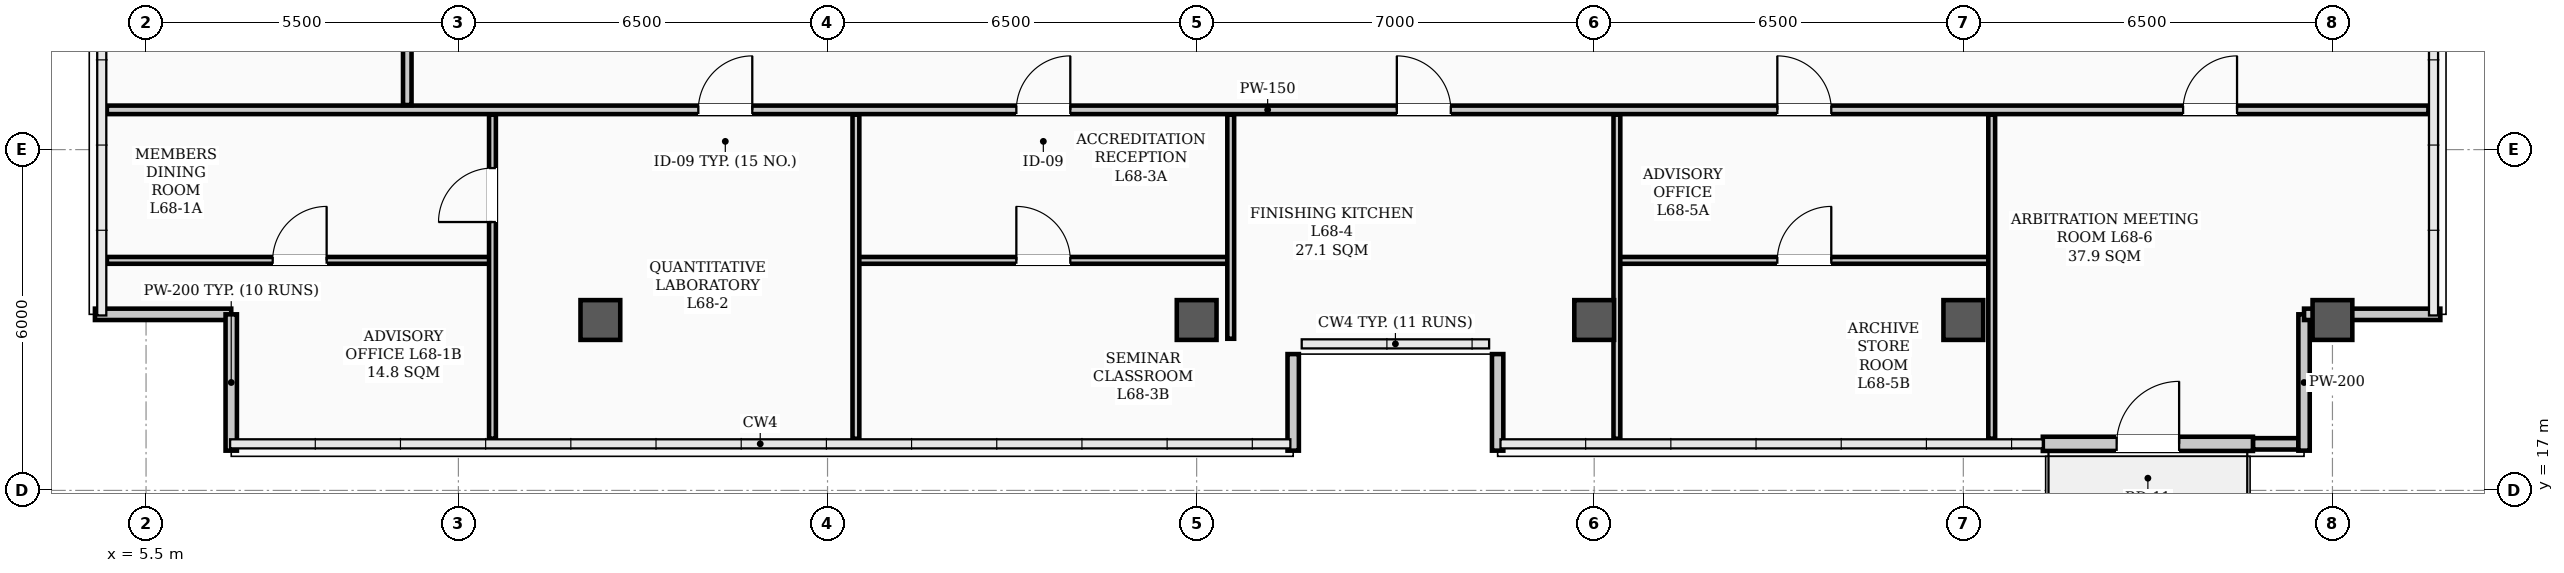
"""IFC4 building model, lengths in metres.
Left out: names, types, materials, properties, quantities, classifications, styles, units other than length and angle.
Written with IfcOpenShell. Run it as: python <this file> out.ifc"""

import sys

from ifc_helpers import new_model, si_unit, direction, frame, frame_2d, origin, origin_2d, place, context, subcontext, project, spatial, rectangle, hollow_rectangle, extrude, element, fill, save


model = new_model("IFC4")
c1 = context("Model", 3, precision=1e-05, world=origin(), true_north=direction((0.0, 1.0)))
c2 = subcontext(c1, "Body", "Model", "MODEL_VIEW")
j1 = project(units=[si_unit("LENGTHUNIT", "METRE"), si_unit("PLANEANGLEUNIT", "RADIAN")], contexts=[c1])
p1 = place(None, origin())
s1 = spatial("IfcSite", under=j1, at=p1, CompositionType="ELEMENT")
p2 = place(p1, origin())
s2 = spatial("IfcBuilding", under=s1, at=p2, CompositionType="ELEMENT")
p3 = place(p2, frame((0.0, 0.0, 273.5)))
s3 = spatial("IfcBuildingStorey", under=s2, at=p3, CompositionType="ELEMENT", Elevation=273.5)
for number, where, z_axis, x_axis in (
    (1, (13.5, 20.0, 0.0), (0.0, 0.0, 1.0), (1.0, 0.0, 0.0)),
    (2, (24.0, 20.0, 0.0), (0.0, 0.0, 1.0), (1.0, 0.0, 0.0)),
    (3, (31.0, 20.0, 0.0), (0.0, 0.0, 1.0), (1.0, 0.0, 0.0)),
    (4, (37.5, 20.0, 0.0), (0.0, 0.0, 1.0), (1.0, 0.0, 0.0)),
    (5, (44.0, 20.0, 0.0), (0.0, 0.0, 1.0), (1.0, 0.0, 0.0)),
):
    element("IfcColumn", number, at=place(p3, frame(where, z_axis=z_axis, x_axis=x_axis)), inside=s3, PredefinedType="COLUMN", context=c2, shape_type="SweptSolid", body=[
        extrude(hollow_rectangle(XDim=0.7, YDim=0.7, WallThickness=0.028, InnerFilletRadius=0.014, OuterFilletRadius=0.042, at=origin_2d()), origin(), (0.0, 0.0, 1.0), 3.9),
    ])
p4 = place(p3, frame((42.6, 17.82, 0.0), z_axis=(0.0, 0.0, 1.0), x_axis=(1.0, 0.0, 0.0)))
e6 = element("IfcWall", 6, at=p4, inside=s3, PredefinedType="PARAPET", context=c2, shape_type="SweptSolid", body=[
    extrude(rectangle(XDim=0.8, YDim=0.2, at=frame_2d((0.4, 0.0))), origin(), (0.0, 0.0, 1.0), 1.2),
])
p5 = place(p3, frame((4.6, 20.1, 0.0), z_axis=(0.0, 0.0, 1.0), x_axis=(1.0, 0.0, 0.0)))
e7 = element("IfcWall", 7, at=p5, inside=s3, PredefinedType="PARAPET", context=c2, shape_type="SweptSolid", body=[
    extrude(rectangle(XDim=2.4, YDim=0.2, at=frame_2d((1.2, 0.0))), origin(), (0.0, 0.0, 1.0), 1.2),
])
for number, where, z_axis, x_axis in (
    (8, (7.0, 20.1, 0.0), (0.0, 0.0, 1.0), (0.0, -1.0, 0.0)),
    (9, (43.5, 17.7, 0.0), (0.0, 0.0, 1.0), (0.0, 1.0, 0.0)),
):
    element("IfcWall", number, at=place(p3, frame(where, z_axis=z_axis, x_axis=x_axis)), inside=s3, PredefinedType="PARAPET", context=c2, shape_type="SweptSolid", body=[
        extrude(rectangle(XDim=2.4, YDim=0.2, at=frame_2d((1.2, 0.0))), origin(), (0.0, 0.0, 1.0), 1.2),
    ])
p6 = place(p3, frame((43.5, 20.1, 0.0), z_axis=(0.0, 0.0, 1.0), x_axis=(1.0, 0.0, 0.0)))
e10 = element("IfcWall", 10, at=p6, inside=s3, PredefinedType="PARAPET", context=c2, shape_type="SweptSolid", body=[
    extrude(rectangle(XDim=2.4, YDim=0.2, at=frame_2d((1.2, 0.0))), origin(), (0.0, 0.0, 1.0), 1.2),
])
for number, where, z_axis, x_axis in (
    (11, (25.7, 17.7, 0.0), (0.0, 0.0, 1.0), (0.0, 1.0, 0.0)),
    (12, (29.3, 19.4, 0.0), (0.0, 0.0, 1.0), (0.0, -1.0, 0.0)),
):
    element("IfcWall", number, at=place(p3, frame(where, z_axis=z_axis, x_axis=x_axis)), inside=s3, PredefinedType="PARAPET", context=c2, shape_type="SweptSolid", body=[
        extrude(rectangle(XDim=1.7, YDim=0.2, at=frame_2d((0.85, 0.0))), origin(), (0.0, 0.0, 1.0), 1.2),
    ])
p7 = place(p3, frame((38.9, 17.82, 0.0), z_axis=(0.0, 0.0, 1.0), x_axis=(1.0, 0.0, 0.0)))
e13 = element("IfcWall", 13, at=p7, inside=s3, PredefinedType="STANDARD", context=c2, shape_type="SweptSolid", body=[
    extrude(rectangle(XDim=3.7, YDim=0.25, at=frame_2d((1.85, 0.0))), origin(), (0.0, 0.0, 1.0), 3.18),
])
p8 = place(p7, frame((1.3, 0.0, 0.0)))
e14 = element("IfcOpeningElement", 14, at=p8, cuts=e13, PredefinedType="OPENING", context=c2, shape_type="SweptSolid", body=[
    extrude(rectangle(XDim=1.1, YDim=2.2, at=frame_2d((0.55, 1.1))), frame((0.0, 0.135, 0.0), z_axis=(0.0, -1.0, 0.0), x_axis=(1.0, 0.0, 0.0)), (0.0, 0.0, 1.0), 0.27),
])
p9 = place(p3, frame((4.81, 23.7, 0.0), z_axis=(0.0, 0.0, 1.0), x_axis=(1.0, 0.0, 0.0)))
e15 = element("IfcWall", 15, at=p9, inside=s3, PredefinedType="PARTITIONING", context=c2, shape_type="SweptSolid", body=[
    extrude(rectangle(XDim=40.88, YDim=0.15, at=frame_2d((20.44, 0.0))), origin(), (0.0, 0.0, 1.0), 3.2),
])
p10 = place(p9, frame((10.415, 0.0, 0.0)))
e16 = element("IfcOpeningElement", 16, at=p10, cuts=e15, PredefinedType="OPENING", context=c2, shape_type="SweptSolid", body=[
    extrude(rectangle(XDim=0.95, YDim=2.08, at=frame_2d((0.475, 1.04))), frame((0.0, 0.085, 0.0), z_axis=(0.0, -1.0, 0.0), x_axis=(1.0, 0.0, 0.0)), (0.0, 0.0, 1.0), 0.17),
])
p11 = place(p9, frame((16.015, 0.0, 0.0)))
e17 = element("IfcOpeningElement", 17, at=p11, cuts=e15, PredefinedType="OPENING", context=c2, shape_type="SweptSolid", body=[
    extrude(rectangle(XDim=0.95, YDim=2.08, at=frame_2d((0.475, 1.04))), frame((0.0, 0.085, 0.0), z_axis=(0.0, -1.0, 0.0), x_axis=(1.0, 0.0, 0.0)), (0.0, 0.0, 1.0), 0.17),
])
p12 = place(p9, frame((22.715, 0.0, 0.0)))
e18 = element("IfcOpeningElement", 18, at=p12, cuts=e15, PredefinedType="OPENING", context=c2, shape_type="SweptSolid", body=[
    extrude(rectangle(XDim=0.95, YDim=2.08, at=frame_2d((0.475, 1.04))), frame((0.0, 0.085, 0.0), z_axis=(0.0, -1.0, 0.0), x_axis=(1.0, 0.0, 0.0)), (0.0, 0.0, 1.0), 0.17),
])
p13 = place(p9, frame((29.415, 0.0, 0.0)))
e19 = element("IfcOpeningElement", 19, at=p13, cuts=e15, PredefinedType="OPENING", context=c2, shape_type="SweptSolid", body=[
    extrude(rectangle(XDim=0.95, YDim=2.08, at=frame_2d((0.475, 1.04))), frame((0.0, 0.085, 0.0), z_axis=(0.0, -1.0, 0.0), x_axis=(1.0, 0.0, 0.0)), (0.0, 0.0, 1.0), 0.17),
])
p14 = place(p9, frame((36.56, 0.0, 0.0)))
e20 = element("IfcOpeningElement", 20, at=p14, cuts=e15, PredefinedType="OPENING", context=c2, shape_type="SweptSolid", body=[
    extrude(rectangle(XDim=0.95, YDim=2.08, at=frame_2d((0.475, 1.04))), frame((0.0, 0.085, 0.0), z_axis=(0.0, -1.0, 0.0), x_axis=(1.0, 0.0, 0.0)), (0.0, 0.0, 1.0), 0.17),
])
p15 = place(p3, frame((4.81, 21.05, 0.0), z_axis=(0.0, 0.0, 1.0), x_axis=(1.0, 0.0, 0.0)))
e21 = element("IfcWall", 21, at=p15, inside=s3, PredefinedType="PARTITIONING", context=c2, shape_type="SweptSolid", body=[
    extrude(rectangle(XDim=6.79, YDim=0.12, at=frame_2d((3.395, 0.0))), origin(), (0.0, 0.0, 1.0), 3.72),
])
p16 = place(p15, frame((2.92, 0.0, 0.0)))
e22 = element("IfcOpeningElement", 22, at=p16, cuts=e21, PredefinedType="OPENING", context=c2, shape_type="SweptSolid", body=[
    extrude(rectangle(XDim=0.95, YDim=2.08, at=frame_2d((0.475, 1.04))), frame((0.0, 0.07, 0.0), z_axis=(0.0, -1.0, 0.0), x_axis=(1.0, 0.0, 0.0)), (0.0, 0.0, 1.0), 0.14),
])
p17 = place(p3, frame((18.0, 21.05, 0.0), z_axis=(0.0, 0.0, 1.0), x_axis=(1.0, 0.0, 0.0)))
e23 = element("IfcWall", 23, at=p17, inside=s3, PredefinedType="PARTITIONING", context=c2, shape_type="SweptSolid", body=[
    extrude(rectangle(XDim=6.6, YDim=0.12, at=frame_2d((3.3, 0.0))), origin(), (0.0, 0.0, 1.0), 3.2),
])
p18 = place(p17, frame((2.825, 0.0, 0.0)))
e24 = element("IfcOpeningElement", 24, at=p18, cuts=e23, PredefinedType="OPENING", context=c2, shape_type="SweptSolid", body=[
    extrude(rectangle(XDim=0.95, YDim=2.08, at=frame_2d((0.475, 1.04))), frame((0.0, 0.07, 0.0), z_axis=(0.0, -1.0, 0.0), x_axis=(1.0, 0.0, 0.0)), (0.0, 0.0, 1.0), 0.14),
])
p19 = place(p3, frame((31.4, 21.05, 0.0), z_axis=(0.0, 0.0, 1.0), x_axis=(1.0, 0.0, 0.0)))
e25 = element("IfcWall", 25, at=p19, inside=s3, PredefinedType="PARTITIONING", context=c2, shape_type="SweptSolid", body=[
    extrude(rectangle(XDim=6.6, YDim=0.12, at=frame_2d((3.3, 0.0))), origin(), (0.0, 0.0, 1.0), 3.2),
])
p20 = place(p19, frame((2.825, 0.0, 0.0)))
e26 = element("IfcOpeningElement", 26, at=p20, cuts=e25, PredefinedType="OPENING", context=c2, shape_type="SweptSolid", body=[
    extrude(rectangle(XDim=0.95, YDim=2.08, at=frame_2d((0.475, 1.04))), frame((0.0, 0.07, 0.0), z_axis=(0.0, -1.0, 0.0), x_axis=(1.0, 0.0, 0.0)), (0.0, 0.0, 1.0), 0.14),
])
p21 = place(p3, frame((10.1, 23.785, 0.0), z_axis=(0.0, 0.0, 1.0), x_axis=(0.0, 1.0, 0.0)))
e27 = element("IfcWall", 27, at=p21, inside=s3, PredefinedType="PARTITIONING", context=c2, shape_type="SweptSolid", body=[
    extrude(rectangle(XDim=17.88, YDim=0.15, at=frame_2d((8.94, 0.0))), origin(), (0.0, 0.0, 1.0), 3.1),
])
p22 = place(p21, frame((8.465, 0.0, 0.0)))
e28 = element("IfcOpeningElement", 28, at=p22, cuts=e27, PredefinedType="OPENING", context=c2, shape_type="SweptSolid", body=[
    extrude(rectangle(XDim=0.95, YDim=2.08, at=frame_2d((0.475, 1.04))), frame((0.0, 0.085, 0.0), z_axis=(0.0, -1.0, 0.0), x_axis=(1.0, 0.0, 0.0)), (0.0, 0.0, 1.0), 0.17),
])
p23 = place(p3, frame((11.6, 17.91, 0.0), z_axis=(0.0, 0.0, 1.0), x_axis=(0.0, 1.0, 0.0)))
e29 = element("IfcWall", 29, at=p23, inside=s3, PredefinedType="PARTITIONING", context=c2, shape_type="SweptSolid", body=[
    extrude(rectangle(XDim=5.705, YDim=0.12, at=frame_2d((2.853, 0.0))), origin(), (0.0, 0.0, 1.0), 3.72),
])
p24 = place(p23, frame((3.815, 0.0, 0.0)))
e30 = element("IfcOpeningElement", 30, at=p24, cuts=e29, PredefinedType="OPENING", context=c2, shape_type="SweptSolid", body=[
    extrude(rectangle(XDim=0.95, YDim=2.08, at=frame_2d((0.475, 1.04))), frame((0.0, 0.07, 0.0), z_axis=(0.0, -1.0, 0.0), x_axis=(1.0, 0.0, 0.0)), (0.0, 0.0, 1.0), 0.14),
])
p25 = place(p3, frame((18.0, 17.91, 0.0), z_axis=(0.0, 0.0, 1.0), x_axis=(0.0, 1.0, 0.0)))
e31 = element("IfcWall", 31, at=p25, inside=s3, PredefinedType="PARTITIONING", context=c2, shape_type="SweptSolid", body=[
    extrude(rectangle(XDim=5.705, YDim=0.12, at=frame_2d((2.853, 0.0))), origin(), (0.0, 0.0, 1.0), 3.1),
])
p26 = place(p3, frame((24.6, 19.67, 0.0), z_axis=(0.0, 0.0, 1.0), x_axis=(0.0, 1.0, 0.0)))
e32 = element("IfcWall", 32, at=p26, inside=s3, PredefinedType="PARTITIONING", context=c2, shape_type="SweptSolid", body=[
    extrude(rectangle(XDim=3.945, YDim=0.12, at=frame_2d((1.973, 0.0))), origin(), (0.0, 0.0, 1.0), 3.1),
])
for number, where, z_axis, x_axis in (
    (33, (31.4, 17.91, 0.0), (0.0, 0.0, 1.0), (0.0, 1.0, 0.0)),
    (34, (38.0, 17.91, 0.0), (0.0, 0.0, 1.0), (0.0, 1.0, 0.0)),
):
    element("IfcWall", number, at=place(p3, frame(where, z_axis=z_axis, x_axis=x_axis)), inside=s3, PredefinedType="PARTITIONING", context=c2, shape_type="SweptSolid", body=[
        extrude(rectangle(XDim=5.705, YDim=0.12, at=frame_2d((2.853, 0.0))), origin(), (0.0, 0.0, 1.0), 3.1),
    ])
p27 = place(p8, origin())
e35 = element("IfcDoor", 35, at=p27, inside=s3, OperationType="SINGLE_SWING_RIGHT", PredefinedType="DOOR", context=c2, shape_type="SweptSolid", body=[
    extrude(rectangle(XDim=1.1, YDim=2.2, at=frame_2d((0.55, 1.1))), frame((0.0, 0.025, 0.0), z_axis=(0.0, -1.0, 0.0), x_axis=(1.0, 0.0, 0.0)), (0.0, 0.0, 1.0), 0.05),
])
fill(e14, e35)
p28 = place(p16, origin())
e36 = element("IfcDoor", 36, at=p28, inside=s3, OperationType="SINGLE_SWING_RIGHT", PredefinedType="DOOR", context=c2, shape_type="SweptSolid", body=[
    extrude(rectangle(XDim=0.95, YDim=2.08, at=frame_2d((0.475, 1.04))), frame((0.0, 0.025, 0.0), z_axis=(0.0, -1.0, 0.0), x_axis=(1.0, 0.0, 0.0)), (0.0, 0.0, 1.0), 0.05),
])
fill(e22, e36)
p29 = place(p24, origin())
e37 = element("IfcDoor", 37, at=p29, inside=s3, OperationType="SINGLE_SWING_LEFT", PredefinedType="DOOR", context=c2, shape_type="SweptSolid", body=[
    extrude(rectangle(XDim=0.95, YDim=2.08, at=frame_2d((0.475, 1.04))), frame((0.0, 0.025, 0.0), z_axis=(0.0, -1.0, 0.0), x_axis=(1.0, 0.0, 0.0)), (0.0, 0.0, 1.0), 0.05),
])
fill(e30, e37)
p30 = place(p10, origin())
e38 = element("IfcDoor", 38, at=p30, inside=s3, OperationType="SINGLE_SWING_RIGHT", PredefinedType="DOOR", context=c2, shape_type="SweptSolid", body=[
    extrude(rectangle(XDim=0.95, YDim=2.08, at=frame_2d((0.475, 1.04))), frame((0.0, 0.025, 0.0), z_axis=(0.0, -1.0, 0.0), x_axis=(1.0, 0.0, 0.0)), (0.0, 0.0, 1.0), 0.05),
])
fill(e16, e38)
p31 = place(p18, origin())
e39 = element("IfcDoor", 39, at=p31, inside=s3, OperationType="SINGLE_SWING_LEFT", PredefinedType="DOOR", context=c2, shape_type="SweptSolid", body=[
    extrude(rectangle(XDim=0.95, YDim=2.08, at=frame_2d((0.475, 1.04))), frame((0.0, 0.025, 0.0), z_axis=(0.0, -1.0, 0.0), x_axis=(1.0, 0.0, 0.0)), (0.0, 0.0, 1.0), 0.05),
])
fill(e24, e39)
p32 = place(p11, origin())
e40 = element("IfcDoor", 40, at=p32, inside=s3, OperationType="SINGLE_SWING_RIGHT", PredefinedType="DOOR", context=c2, shape_type="SweptSolid", body=[
    extrude(rectangle(XDim=0.95, YDim=2.08, at=frame_2d((0.475, 1.04))), frame((0.0, 0.025, 0.0), z_axis=(0.0, -1.0, 0.0), x_axis=(1.0, 0.0, 0.0)), (0.0, 0.0, 1.0), 0.05),
])
fill(e17, e40)
p33 = place(p12, origin())
e41 = element("IfcDoor", 41, at=p33, inside=s3, OperationType="SINGLE_SWING_LEFT", PredefinedType="DOOR", context=c2, shape_type="SweptSolid", body=[
    extrude(rectangle(XDim=0.95, YDim=2.08, at=frame_2d((0.475, 1.04))), frame((0.0, 0.025, 0.0), z_axis=(0.0, -1.0, 0.0), x_axis=(1.0, 0.0, 0.0)), (0.0, 0.0, 1.0), 0.05),
])
fill(e18, e41)
p34 = place(p20, origin())
e42 = element("IfcDoor", 42, at=p34, inside=s3, OperationType="SINGLE_SWING_RIGHT", PredefinedType="DOOR", context=c2, shape_type="SweptSolid", body=[
    extrude(rectangle(XDim=0.95, YDim=2.08, at=frame_2d((0.475, 1.04))), frame((0.0, 0.025, 0.0), z_axis=(0.0, -1.0, 0.0), x_axis=(1.0, 0.0, 0.0)), (0.0, 0.0, 1.0), 0.05),
])
fill(e26, e42)
p35 = place(p13, origin())
e43 = element("IfcDoor", 43, at=p35, inside=s3, OperationType="SINGLE_SWING_LEFT", PredefinedType="DOOR", context=c2, shape_type="SweptSolid", body=[
    extrude(rectangle(XDim=0.95, YDim=2.08, at=frame_2d((0.475, 1.04))), frame((0.0, 0.025, 0.0), z_axis=(0.0, -1.0, 0.0), x_axis=(1.0, 0.0, 0.0)), (0.0, 0.0, 1.0), 0.05),
])
fill(e19, e43)
p36 = place(p14, origin())
e44 = element("IfcDoor", 44, at=p36, inside=s3, OperationType="SINGLE_SWING_RIGHT", PredefinedType="DOOR", context=c2, shape_type="SweptSolid", body=[
    extrude(rectangle(XDim=0.95, YDim=2.08, at=frame_2d((0.475, 1.04))), frame((0.0, 0.025, 0.0), z_axis=(0.0, -1.0, 0.0), x_axis=(1.0, 0.0, 0.0)), (0.0, 0.0, 1.0), 0.05),
])
fill(e20, e44)
save(model, sys.argv[1])
